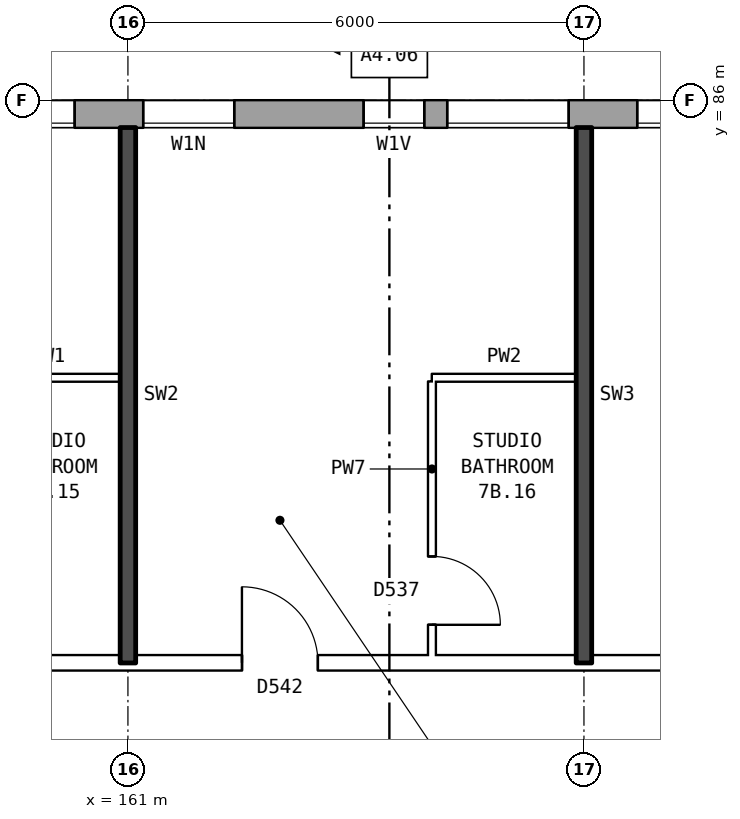
"""IFC4 building model, lengths in metres.
Left out: names, types, materials, properties, quantities, classifications, styles, units other than length and angle.
Written with IfcOpenShell. Run it as: python <this file> out.ifc"""

import sys

from ifc_helpers import new_model, si_unit, direction, frame, frame_2d, origin, place, context, subcontext, project, spatial, rectangle, extrude, element, fill, save


model = new_model("IFC4")
c1 = context("Model", 3, precision=1e-05, world=origin(), true_north=direction((0.0, 1.0)))
c2 = subcontext(c1, "Body", "Model", "MODEL_VIEW")
j1 = project(units=[si_unit("LENGTHUNIT", "METRE"), si_unit("PLANEANGLEUNIT", "RADIAN")], contexts=[c1])
p1 = place(None, origin())
s1 = spatial("IfcSite", under=j1, at=p1, CompositionType="ELEMENT")
p2 = place(p1, origin())
s2 = spatial("IfcBuilding", under=s1, at=p2, CompositionType="ELEMENT")
p3 = place(p2, frame((0.0, 0.0, 28.8)))
s3 = spatial("IfcBuildingStorey", under=s2, at=p3, CompositionType="ELEMENT", Elevation=28.8)
p4 = place(p3, frame((174.675, 85.82, 0.0), z_axis=(0.0, 0.0, 1.0), x_axis=(-1.0, 0.0, 0.0)))
e1 = element("IfcWall", 1, at=p4, inside=s3, PredefinedType="STANDARD", context=c2, shape_type="SweptSolid", body=[
    extrude(rectangle(XDim=40.601, YDim=0.36, at=frame_2d((20.3, 0.0))), origin(), (0.0, 0.0, 1.0), 2.85),
])
p5 = place(p4, frame((2.375, 0.0, 0.8)))
e2 = element("IfcOpeningElement", 2, at=p5, cuts=e1, PredefinedType="OPENING", context=c2, shape_type="SweptSolid", body=[
    extrude(rectangle(XDim=1.6, YDim=1.8, at=frame_2d((0.8, 0.9))), frame((0.0, 0.19, 0.0), z_axis=(0.0, -1.0, 0.0), x_axis=(1.0, 0.0, 0.0)), (0.0, 0.0, 1.0), 0.38),
])
p6 = place(p4, frame((5.375, 0.0, 0.8)))
e3 = element("IfcOpeningElement", 3, at=p6, cuts=e1, PredefinedType="OPENING", context=c2, shape_type="SweptSolid", body=[
    extrude(rectangle(XDim=1.6, YDim=1.8, at=frame_2d((0.8, 0.9))), frame((0.0, 0.19, 0.0), z_axis=(0.0, -1.0, 0.0), x_axis=(1.0, 0.0, 0.0)), (0.0, 0.0, 1.0), 0.38),
])
p7 = place(p4, frame((7.875, 0.0, 0.8)))
e4 = element("IfcOpeningElement", 4, at=p7, cuts=e1, PredefinedType="OPENING", context=c2, shape_type="SweptSolid", body=[
    extrude(rectangle(XDim=1.6, YDim=1.8, at=frame_2d((0.8, 0.9))), frame((0.0, 0.19, 0.0), z_axis=(0.0, -1.0, 0.0), x_axis=(1.0, 0.0, 0.0)), (0.0, 0.0, 1.0), 0.38),
])
p8 = place(p4, frame((9.775, 0.0, 1.7)))
e5 = element("IfcOpeningElement", 5, at=p8, cuts=e1, PredefinedType="OPENING", context=c2, shape_type="SweptSolid", body=[
    extrude(rectangle(XDim=0.8, YDim=0.9, at=frame_2d((0.4, 0.45))), frame((0.0, 0.19, 0.0), z_axis=(0.0, -1.0, 0.0), x_axis=(1.0, 0.0, 0.0)), (0.0, 0.0, 1.0), 0.38),
])
p9 = place(p4, frame((14.375, 0.0, 0.8)))
e6 = element("IfcOpeningElement", 6, at=p9, cuts=e1, PredefinedType="OPENING", context=c2, shape_type="SweptSolid", body=[
    extrude(rectangle(XDim=1.6, YDim=1.8, at=frame_2d((0.8, 0.9))), frame((0.0, 0.19, 0.0), z_axis=(0.0, -1.0, 0.0), x_axis=(1.0, 0.0, 0.0)), (0.0, 0.0, 1.0), 0.38),
])
p10 = place(p4, frame((17.375, 0.0, 0.8)))
e7 = element("IfcOpeningElement", 7, at=p10, cuts=e1, PredefinedType="OPENING", context=c2, shape_type="SweptSolid", body=[
    extrude(rectangle(XDim=1.6, YDim=1.8, at=frame_2d((0.8, 0.9))), frame((0.0, 0.19, 0.0), z_axis=(0.0, -1.0, 0.0), x_axis=(1.0, 0.0, 0.0)), (0.0, 0.0, 1.0), 0.38),
])
p11 = place(p4, frame((20.375, 0.0, 0.8)))
e8 = element("IfcOpeningElement", 8, at=p11, cuts=e1, PredefinedType="OPENING", context=c2, shape_type="SweptSolid", body=[
    extrude(rectangle(XDim=1.6, YDim=1.8, at=frame_2d((0.8, 0.9))), frame((0.0, 0.19, 0.0), z_axis=(0.0, -1.0, 0.0), x_axis=(1.0, 0.0, 0.0)), (0.0, 0.0, 1.0), 0.38),
])
p12 = place(p4, frame((23.375, 0.0, 0.8)))
e9 = element("IfcOpeningElement", 9, at=p12, cuts=e1, PredefinedType="OPENING", context=c2, shape_type="SweptSolid", body=[
    extrude(rectangle(XDim=1.6, YDim=1.8, at=frame_2d((0.8, 0.9))), frame((0.0, 0.19, 0.0), z_axis=(0.0, -1.0, 0.0), x_axis=(1.0, 0.0, 0.0)), (0.0, 0.0, 1.0), 0.38),
])
p13 = place(p4, frame((25.875, 0.0, 0.8)))
e10 = element("IfcOpeningElement", 10, at=p13, cuts=e1, PredefinedType="OPENING", context=c2, shape_type="SweptSolid", body=[
    extrude(rectangle(XDim=1.6, YDim=1.8, at=frame_2d((0.8, 0.9))), frame((0.0, 0.19, 0.0), z_axis=(0.0, -1.0, 0.0), x_axis=(1.0, 0.0, 0.0)), (0.0, 0.0, 1.0), 0.38),
])
p14 = place(p4, frame((28.825, 0.0, 0.15)))
e11 = element("IfcOpeningElement", 11, at=p14, cuts=e1, PredefinedType="OPENING", context=c2, shape_type="SweptSolid", body=[
    extrude(rectangle(XDim=0.6, YDim=0.9, at=frame_2d((0.3, 0.45))), frame((0.0, 0.19, 0.0), z_axis=(0.0, -1.0, 0.0), x_axis=(1.0, 0.0, 0.0)), (0.0, 0.0, 1.0), 0.38),
])
p15 = place(p4, frame((32.375, 0.0, 0.8)))
e12 = element("IfcOpeningElement", 12, at=p15, cuts=e1, PredefinedType="OPENING", context=c2, shape_type="SweptSolid", body=[
    extrude(rectangle(XDim=1.6, YDim=1.8, at=frame_2d((0.8, 0.9))), frame((0.0, 0.19, 0.0), z_axis=(0.0, -1.0, 0.0), x_axis=(1.0, 0.0, 0.0)), (0.0, 0.0, 1.0), 0.38),
])
p16 = place(p4, frame((35.375, 0.0, 0.8)))
e13 = element("IfcOpeningElement", 13, at=p16, cuts=e1, PredefinedType="OPENING", context=c2, shape_type="SweptSolid", body=[
    extrude(rectangle(XDim=1.6, YDim=1.8, at=frame_2d((0.8, 0.9))), frame((0.0, 0.19, 0.0), z_axis=(0.0, -1.0, 0.0), x_axis=(1.0, 0.0, 0.0)), (0.0, 0.0, 1.0), 0.38),
])
p17 = place(p4, frame((38.375, 0.0, 0.8)))
e14 = element("IfcOpeningElement", 14, at=p17, cuts=e1, PredefinedType="OPENING", context=c2, shape_type="SweptSolid", body=[
    extrude(rectangle(XDim=1.6, YDim=1.8, at=frame_2d((0.8, 0.9))), frame((0.0, 0.19, 0.0), z_axis=(0.0, -1.0, 0.0), x_axis=(1.0, 0.0, 0.0)), (0.0, 0.0, 1.0), 0.38),
])
p18 = place(p4, frame((12.275, 0.0, 0.8)))
e15 = element("IfcOpeningElement", 15, at=p18, cuts=e1, PredefinedType="OPENING", context=c2, shape_type="SweptSolid", body=[
    extrude(rectangle(XDim=1.2, YDim=1.2, at=frame_2d((0.6, 0.6))), frame((0.0, 0.19, 0.0), z_axis=(0.0, -1.0, 0.0), x_axis=(1.0, 0.0, 0.0)), (0.0, 0.0, 1.0), 0.38),
])
p19 = place(p4, frame((27.775, 0.0, 0.8)))
e16 = element("IfcOpeningElement", 16, at=p19, cuts=e1, PredefinedType="OPENING", context=c2, shape_type="SweptSolid", body=[
    extrude(rectangle(XDim=0.6, YDim=0.9, at=frame_2d((0.3, 0.45))), frame((0.0, 0.19, 0.0), z_axis=(0.0, -1.0, 0.0), x_axis=(1.0, 0.0, 0.0)), (0.0, 0.0, 1.0), 0.38),
])
p20 = place(p4, frame((30.025, 0.0, 1.65)))
e17 = element("IfcOpeningElement", 17, at=p20, cuts=e1, PredefinedType="OPENING", context=c2, shape_type="SweptSolid", body=[
    extrude(rectangle(XDim=1.4, YDim=0.9, at=frame_2d((0.7, 0.45))), frame((0.0, 0.19, 0.0), z_axis=(0.0, -1.0, 0.0), x_axis=(1.0, 0.0, 0.0)), (0.0, 0.0, 1.0), 0.38),
])
p21 = place(p3, frame((155.1, 78.6, 0.0), z_axis=(0.0, 0.0, 1.0), x_axis=(1.0, 0.0, 0.0)))
e18 = element("IfcWall", 18, at=p21, inside=s3, PredefinedType="PARTITIONING", context=c2, shape_type="SweptSolid", body=[
    extrude(rectangle(XDim=22.29, YDim=0.2, at=frame_2d((11.145, 0.0))), origin(), (0.0, 0.0, 1.0), 2.85),
])
p22 = place(p21, frame((1.45, 0.0, 0.0)))
e19 = element("IfcOpeningElement", 19, at=p22, cuts=e18, PredefinedType="OPENING", context=c2, shape_type="SweptSolid", body=[
    extrude(rectangle(XDim=1.0, YDim=2.1, at=frame_2d((0.5, 1.05))), frame((0.0, 0.11, 0.0), z_axis=(0.0, -1.0, 0.0), x_axis=(1.0, 0.0, 0.0)), (0.0, 0.0, 1.0), 0.22),
])
p23 = place(p21, frame((7.4, 0.0, 0.0)))
e20 = element("IfcOpeningElement", 20, at=p23, cuts=e18, PredefinedType="OPENING", context=c2, shape_type="SweptSolid", body=[
    extrude(rectangle(XDim=1.0, YDim=2.1, at=frame_2d((0.5, 1.05))), frame((0.0, 0.11, 0.0), z_axis=(0.0, -1.0, 0.0), x_axis=(1.0, 0.0, 0.0)), (0.0, 0.0, 1.0), 0.22),
])
p24 = place(p21, frame((14.4, 0.0, 0.0)))
e21 = element("IfcOpeningElement", 21, at=p24, cuts=e18, PredefinedType="OPENING", context=c2, shape_type="SweptSolid", body=[
    extrude(rectangle(XDim=1.0, YDim=2.1, at=frame_2d((0.5, 1.05))), frame((0.0, 0.11, 0.0), z_axis=(0.0, -1.0, 0.0), x_axis=(1.0, 0.0, 0.0)), (0.0, 0.0, 1.0), 0.22),
])
for number, where, z_axis, x_axis in (
    (22, (159.0, 82.35, 0.0), (0.0, 0.0, 1.0), (1.0, 0.0, 0.0)),
    (23, (165.0, 82.35, 0.0), (0.0, 0.0, 1.0), (1.0, 0.0, 0.0)),
):
    element("IfcWall", number, at=place(p3, frame(where, z_axis=z_axis, x_axis=x_axis)), inside=s3, PredefinedType="PARTITIONING", context=c2, shape_type="SweptSolid", body=[
        extrude(rectangle(XDim=1.9, YDim=0.1, at=frame_2d((0.95, 0.0))), origin(), (0.0, 0.0, 1.0), 2.85),
    ])
p25 = place(p3, frame((161.0, 78.6, 0.0), z_axis=(0.0, 0.0, 1.0), x_axis=(0.0, 1.0, 0.0)))
e24 = element("IfcWall", 24, at=p25, inside=s3, PredefinedType="SOLIDWALL", context=c2, shape_type="SweptSolid", body=[
    extrude(rectangle(XDim=7.04, YDim=0.2, at=frame_2d((3.52, 0.0))), origin(), (0.0, 0.0, 1.0), 2.85),
])
p26 = place(p3, frame((165.0, 78.7, 0.0), z_axis=(0.0, 0.0, 1.0), x_axis=(0.0, 1.0, 0.0)))
e25 = element("IfcWall", 25, at=p26, inside=s3, PredefinedType="PARTITIONING", context=c2, shape_type="SweptSolid", body=[
    extrude(rectangle(XDim=3.6, YDim=0.1, at=frame_2d((1.8, 0.0))), origin(), (0.0, 0.0, 1.0), 2.85),
])
p27 = place(p26, frame((0.4, 0.0, 0.0)))
e26 = element("IfcOpeningElement", 26, at=p27, cuts=e25, PredefinedType="OPENING", context=c2, shape_type="SweptSolid", body=[
    extrude(rectangle(XDim=0.9, YDim=2.1, at=frame_2d((0.45, 1.05))), frame((0.0, 0.06, 0.0), z_axis=(0.0, -1.0, 0.0), x_axis=(1.0, 0.0, 0.0)), (0.0, 0.0, 1.0), 0.12),
])
p28 = place(p3, frame((167.0, 78.6, 0.0), z_axis=(0.0, 0.0, 1.0), x_axis=(0.0, 1.0, 0.0)))
e27 = element("IfcWall", 27, at=p28, inside=s3, PredefinedType="SOLIDWALL", context=c2, shape_type="SweptSolid", body=[
    extrude(rectangle(XDim=7.04, YDim=0.2, at=frame_2d((3.52, 0.0))), origin(), (0.0, 0.0, 1.0), 2.85),
])
p29 = place(p6, origin())
e28 = element("IfcWindow", 28, at=p29, inside=s3, PartitioningType="SINGLE_PANEL", PredefinedType="WINDOW", context=c2, shape_type="SweptSolid", body=[
    extrude(rectangle(XDim=1.6, YDim=1.8, at=frame_2d((0.8, 0.9))), frame((0.0, 0.15, 0.0), z_axis=(0.0, -1.0, 0.0), x_axis=(1.0, 0.0, 0.0)), (0.0, 0.0, 1.0), 0.06),
])
fill(e3, e28)
p30 = place(p7, origin())
e29 = element("IfcWindow", 29, at=p30, inside=s3, PartitioningType="SINGLE_PANEL", PredefinedType="WINDOW", context=c2, shape_type="SweptSolid", body=[
    extrude(rectangle(XDim=1.6, YDim=1.8, at=frame_2d((0.8, 0.9))), frame((0.0, 0.15, 0.0), z_axis=(0.0, -1.0, 0.0), x_axis=(1.0, 0.0, 0.0)), (0.0, 0.0, 1.0), 0.06),
])
fill(e4, e29)
p31 = place(p8, origin())
e30 = element("IfcWindow", 30, at=p31, inside=s3, PartitioningType="SINGLE_PANEL", PredefinedType="WINDOW", context=c2, shape_type="SweptSolid", body=[
    extrude(rectangle(XDim=0.8, YDim=0.9, at=frame_2d((0.4, 0.45))), frame((0.0, 0.15, 0.0), z_axis=(0.0, -1.0, 0.0), x_axis=(1.0, 0.0, 0.0)), (0.0, 0.0, 1.0), 0.06),
])
fill(e5, e30)
p32 = place(p9, origin())
e31 = element("IfcWindow", 31, at=p32, inside=s3, PartitioningType="SINGLE_PANEL", PredefinedType="WINDOW", context=c2, shape_type="SweptSolid", body=[
    extrude(rectangle(XDim=1.6, YDim=1.8, at=frame_2d((0.8, 0.9))), frame((0.0, 0.15, 0.0), z_axis=(0.0, -1.0, 0.0), x_axis=(1.0, 0.0, 0.0)), (0.0, 0.0, 1.0), 0.06),
])
fill(e6, e31)
p33 = place(p23, origin())
e32 = element("IfcDoor", 32, at=p33, inside=s3, OperationType="SINGLE_SWING_LEFT", PredefinedType="DOOR", context=c2, shape_type="SweptSolid", body=[
    extrude(rectangle(XDim=1.0, YDim=2.1, at=frame_2d((0.5, 1.05))), frame((0.0, 0.025, 0.0), z_axis=(0.0, -1.0, 0.0), x_axis=(1.0, 0.0, 0.0)), (0.0, 0.0, 1.0), 0.05),
])
fill(e20, e32)
p34 = place(p27, frame((0.9, 0.0, 0.0), z_axis=(0.0, 0.0, 1.0), x_axis=(-1.0, 0.0, 0.0)))
e33 = element("IfcDoor", 33, at=p34, inside=s3, OperationType="SINGLE_SWING_RIGHT", PredefinedType="DOOR", context=c2, shape_type="SweptSolid", body=[
    extrude(rectangle(XDim=0.9, YDim=2.1, at=frame_2d((0.45, 1.05))), frame((0.0, 0.025, 0.0), z_axis=(0.0, -1.0, 0.0), x_axis=(1.0, 0.0, 0.0)), (0.0, 0.0, 1.0), 0.05),
])
fill(e26, e33)
p35 = place(p18, origin())
e34 = element("IfcWindow", 34, at=p35, inside=s3, PartitioningType="SINGLE_PANEL", PredefinedType="WINDOW", context=c2, shape_type="SweptSolid", body=[
    extrude(rectangle(XDim=1.2, YDim=1.2, at=frame_2d((0.6, 0.6))), frame((0.0, 0.15, 0.0), z_axis=(0.0, -1.0, 0.0), x_axis=(1.0, 0.0, 0.0)), (0.0, 0.0, 1.0), 0.06),
])
fill(e15, e34)
save(model, sys.argv[1])
